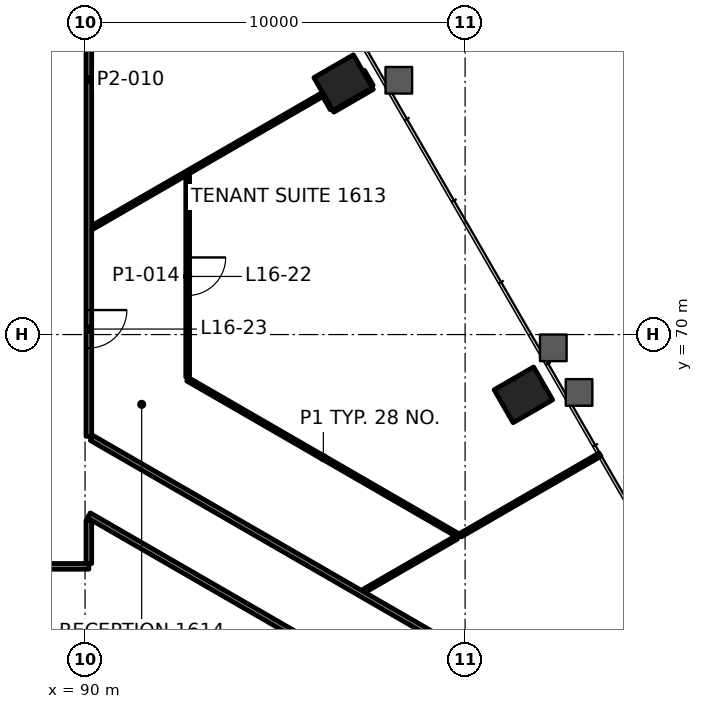
"""IFC4 building model, lengths in metres.
Left out: names, types, materials, properties, quantities, classifications, styles, units other than length and angle.
Written with IfcOpenShell. Run it as: python <this file> out.ifc"""

import sys

from ifc_helpers import new_model, si_unit, direction, frame, frame_2d, origin, origin_2d, place, context, subcontext, project, spatial, rectangle, extrude, element, fill, save


model = new_model("IFC4")
c1 = context("Model", 3, precision=1e-05, world=origin(), true_north=direction((0.0, 1.0)))
c2 = subcontext(c1, "Body", "Model", "MODEL_VIEW")
j1 = project(units=[si_unit("LENGTHUNIT", "METRE"), si_unit("PLANEANGLEUNIT", "RADIAN")], contexts=[c1])
p1 = place(None, origin())
s1 = spatial("IfcSite", under=j1, at=p1, CompositionType="ELEMENT")
p2 = place(p1, origin())
s2 = spatial("IfcBuilding", under=s1, at=p2, CompositionType="ELEMENT")
p3 = place(p2, frame((0.0, 0.0, 73.6)))
s3 = spatial("IfcBuildingStorey", under=s2, at=p3, CompositionType="ELEMENT", Elevation=73.6)
for number, where, z_axis, x_axis in (
    (1, (101.534, 68.414, -0.0), (0.0, 0.0, 1.0), (-0.5, 0.866, 0.0)),
    (2, (96.791, 76.628, -0.0), (0.0, 0.0, 1.0), (-0.5, 0.866, 0.0)),
):
    element("IfcColumn", number, at=place(p3, frame(where, z_axis=z_axis, x_axis=x_axis)), inside=s3, PredefinedType="COLUMN", context=c2, shape_type="SweptSolid", body=[
        extrude(rectangle(XDim=1.0, YDim=1.2, at=origin_2d()), origin(), (0.0, 0.0, 1.0), 4.2),
    ])
p4 = place(p3, frame((90.099, 63.9, 0.0), z_axis=(0.0, 0.0, 1.0), x_axis=(-1.0, 0.0, 0.0)))
e3 = element("IfcWall", 3, at=p4, inside=s3, PredefinedType="PARTITIONING", context=c2, shape_type="SweptSolid", body=[
    extrude(rectangle(XDim=30.199, YDim=0.15, at=frame_2d((15.1, 0.0))), origin(), (0.0, 0.0, 1.0), 3.4),
])
p5 = place(p4, frame((2.309, 0.0, 0.0)))
e4 = element("IfcOpeningElement", 4, at=p5, cuts=e3, PredefinedType="OPENING", context=c2, shape_type="SweptSolid", body=[
    extrude(rectangle(XDim=1.2, YDim=2.1, at=frame_2d((0.6, 1.05))), frame((0.0, 0.085, 0.0), z_axis=(0.0, -1.0, 0.0), x_axis=(1.0, 0.0, 0.0)), (0.0, 0.0, 1.0), 0.17),
])
p6 = place(p4, frame((14.599, 0.0, 0.0)))
e5 = element("IfcOpeningElement", 5, at=p6, cuts=e3, PredefinedType="OPENING", context=c2, shape_type="SweptSolid", body=[
    extrude(rectangle(XDim=1.0, YDim=2.1, at=frame_2d((0.5, 1.05))), frame((0.0, 0.085, 0.0), z_axis=(0.0, -1.0, 0.0), x_axis=(1.0, 0.0, 0.0)), (0.0, 0.0, 1.0), 0.17),
])
p7 = place(p4, frame((26.791, 0.0, 0.0)))
e6 = element("IfcOpeningElement", 6, at=p7, cuts=e3, PredefinedType="OPENING", context=c2, shape_type="SweptSolid", body=[
    extrude(rectangle(XDim=1.0, YDim=2.1, at=frame_2d((0.5, 1.05))), frame((0.0, 0.085, 0.0), z_axis=(0.0, -1.0, 0.0), x_axis=(1.0, 0.0, 0.0)), (0.0, 0.0, 1.0), 0.17),
])
p8 = place(p3, frame((97.343, 63.256, 0.0), z_axis=(0.0, 0.0, 1.0), x_axis=(0.866028733576, 0.499994232587, 0.0)))
e7 = element("IfcWall", 7, at=p8, inside=s3, PredefinedType="PARTITIONING", context=c2, shape_type="SweptSolid", body=[
    extrude(rectangle(XDim=2.799, YDim=0.1, at=frame_2d((1.4, 0.0))), origin(), (0.0, 0.0, 1.0), 3.4),
])
p9 = place(p3, frame((96.522, 75.896, 0.0), z_axis=(0.0, 0.0, 1.0), x_axis=(0.865978732077, 0.500080829057, 0.0)))
e8 = element("IfcWall", 8, at=p9, inside=s3, PredefinedType="PARTITIONING", context=c2, shape_type="SweptSolid", body=[
    extrude(rectangle(XDim=1.199, YDim=0.1, at=frame_2d((0.6, 0.0))), origin(), (0.0, 0.0, 1.0), 3.165),
])
p10 = place(p3, frame((90.201, 72.824, 0.0), z_axis=(0.0, 0.0, 1.0), x_axis=(0.866028979627, 0.499993806408, 0.0)))
e9 = element("IfcWall", 9, at=p10, inside=s3, PredefinedType="PARTITIONING", context=c2, shape_type="SweptSolid", body=[
    extrude(rectangle(XDim=7.009, YDim=0.1, at=frame_2d((3.505, 0.0))), origin(), (0.0, 0.0, 1.0), 3.4),
])
p11 = place(p3, frame((92.7, 74.179, 0.0), z_axis=(0.0, 0.0, 1.0), x_axis=(0.0, -1.0, 0.0)))
e10 = element("IfcWall", 10, at=p11, inside=s3, PredefinedType="PARTITIONING", context=c2, shape_type="SweptSolid", body=[
    extrude(rectangle(XDim=5.299, YDim=0.1, at=frame_2d((2.649, 0.0))), origin(), (0.0, 0.0, 1.0), 3.4),
])
p12 = place(p11, frame((2.149, 0.0, 0.0)))
e11 = element("IfcOpeningElement", 11, at=p12, cuts=e10, PredefinedType="OPENING", context=c2, shape_type="SweptSolid", body=[
    extrude(rectangle(XDim=1.0, YDim=2.1, at=frame_2d((0.5, 1.05))), frame((0.0, 0.06, 0.0), z_axis=(0.0, -1.0, 0.0), x_axis=(1.0, 0.0, 0.0)), (0.0, 0.0, 1.0), 0.12),
])
p13 = place(p3, frame((90.1, 63.976, 0.0), z_axis=(0.0, 0.0, 1.0), x_axis=(0.0, 1.0, 0.0)))
e12 = element("IfcWall", 12, at=p13, inside=s3, PredefinedType="PARTITIONING", context=c2, shape_type="SweptSolid", body=[
    extrude(rectangle(XDim=1.131, YDim=0.15, at=frame_2d((0.565, 0.0))), origin(), (0.0, 0.0, 1.0), 3.247),
])
p14 = place(p3, frame((90.1, 86.099, 0.0), z_axis=(0.0, 0.0, 1.0), x_axis=(0.0, -1.0, 0.0)))
e13 = element("IfcWall", 13, at=p14, inside=s3, PredefinedType="PARTITIONING", context=c2, shape_type="SweptSolid", body=[
    extrude(rectangle(XDim=18.778, YDim=0.15, at=frame_2d((9.389, 0.0))), origin(), (0.0, 0.0, 1.0), 3.4),
])
p15 = place(p14, frame((15.455, 0.0, 0.0)))
e14 = element("IfcOpeningElement", 14, at=p15, cuts=e13, PredefinedType="OPENING", context=c2, shape_type="SweptSolid", body=[
    extrude(rectangle(XDim=1.0, YDim=2.1, at=frame_2d((0.5, 1.05))), frame((0.0, 0.085, 0.0), z_axis=(0.0, -1.0, 0.0), x_axis=(1.0, 0.0, 0.0)), (0.0, 0.0, 1.0), 0.17),
])
p16 = place(p3, frame((97.536, 76.539, 0.0), z_axis=(0.0, 0.0, 1.0), x_axis=(-0.499879237999, 0.866095114533, 0.0)))
e15 = element("IfcWall", 15, at=p16, inside=s3, PredefinedType="PARTITIONING", context=c2, shape_type="SweptSolid", body=[
    extrude(rectangle(XDim=0.449, YDim=0.1, at=frame_2d((0.225, 0.0))), origin(), (0.0, 0.0, 1.0), 3.4),
])
p17 = place(p3, frame((96.496, 75.939, 0.0), z_axis=(0.0, 0.0, 1.0), x_axis=(-0.499757756434, 0.866165218006, 0.0)))
e16 = element("IfcWall", 16, at=p17, inside=s3, PredefinedType="PARTITIONING", context=c2, shape_type="SweptSolid", body=[
    extrude(rectangle(XDim=0.399, YDim=0.1, at=frame_2d((0.2, 0.0))), origin(), (0.0, 0.0, 1.0), 3.4),
])
p18 = place(p3, frame((99.842, 64.699, 0.0), z_axis=(0.0, 0.0, 1.0), x_axis=(-0.866022901237, 0.500004334515, 0.0)))
e17 = element("IfcWall", 17, at=p18, inside=s3, PredefinedType="PARTITIONING", context=c2, shape_type="SweptSolid", body=[
    extrude(rectangle(XDim=8.247, YDim=0.1, at=frame_2d((4.124, 0.0))), origin(), (0.0, 0.0, 1.0), 3.4),
])
p19 = place(p3, frame((102.674, 60.062, 0.0), z_axis=(0.0, 0.0, 1.0), x_axis=(-0.866022486604, 0.50000505267, 0.0)))
e18 = element("IfcWall", 18, at=p19, inside=s3, PredefinedType="PARTITIONING", context=c2, shape_type="SweptSolid", body=[
    extrude(rectangle(XDim=14.433, YDim=0.15, at=frame_2d((7.216, 0.0))), origin(), (0.0, 0.0, 1.0), 3.4),
])
p20 = place(p3, frame((101.774, 58.503, 0.0), z_axis=(0.0, 0.0, 1.0), x_axis=(-0.866023326939, 0.500003597184, 0.0)))
e19 = element("IfcWall", 19, at=p20, inside=s3, PredefinedType="PARTITIONING", context=c2, shape_type="SweptSolid", body=[
    extrude(rectangle(XDim=13.48, YDim=0.15, at=frame_2d((6.74, 0.0))), origin(), (0.0, 0.0, 1.0), 3.247),
])
p21 = place(p3, frame((99.879, 64.721, 0.0), z_axis=(0.0, 0.0, 1.0), x_axis=(0.866030225258, 0.499991648869, 0.0)))
e20 = element("IfcWall", 20, at=p21, inside=s3, PredefinedType="PARTITIONING", context=c2, shape_type="SweptSolid", body=[
    extrude(rectangle(XDim=4.239, YDim=0.1, at=frame_2d((2.12, 0.0))), origin(), (0.0, 0.0, 1.0), 3.4),
])
p22 = place(p12, origin())
e21 = element("IfcDoor", 21, at=p22, inside=s3, OperationType="SINGLE_SWING_LEFT", PredefinedType="DOOR", context=c2, shape_type="SweptSolid", body=[
    extrude(rectangle(XDim=1.0, YDim=2.1, at=frame_2d((0.5, 1.05))), frame((0.0, 0.025, 0.0), z_axis=(0.0, -1.0, 0.0), x_axis=(1.0, 0.0, 0.0)), (0.0, 0.0, 1.0), 0.05),
])
fill(e11, e21)
p23 = place(p15, origin())
e22 = element("IfcDoor", 22, at=p23, inside=s3, OperationType="SINGLE_SWING_RIGHT", PredefinedType="DOOR", context=c2, shape_type="SweptSolid", body=[
    extrude(rectangle(XDim=1.0, YDim=2.1, at=frame_2d((0.5, 1.05))), frame((0.0, 0.025, 0.0), z_axis=(0.0, -1.0, 0.0), x_axis=(1.0, 0.0, 0.0)), (0.0, 0.0, 1.0), 0.05),
])
fill(e14, e22)
save(model, sys.argv[1])
